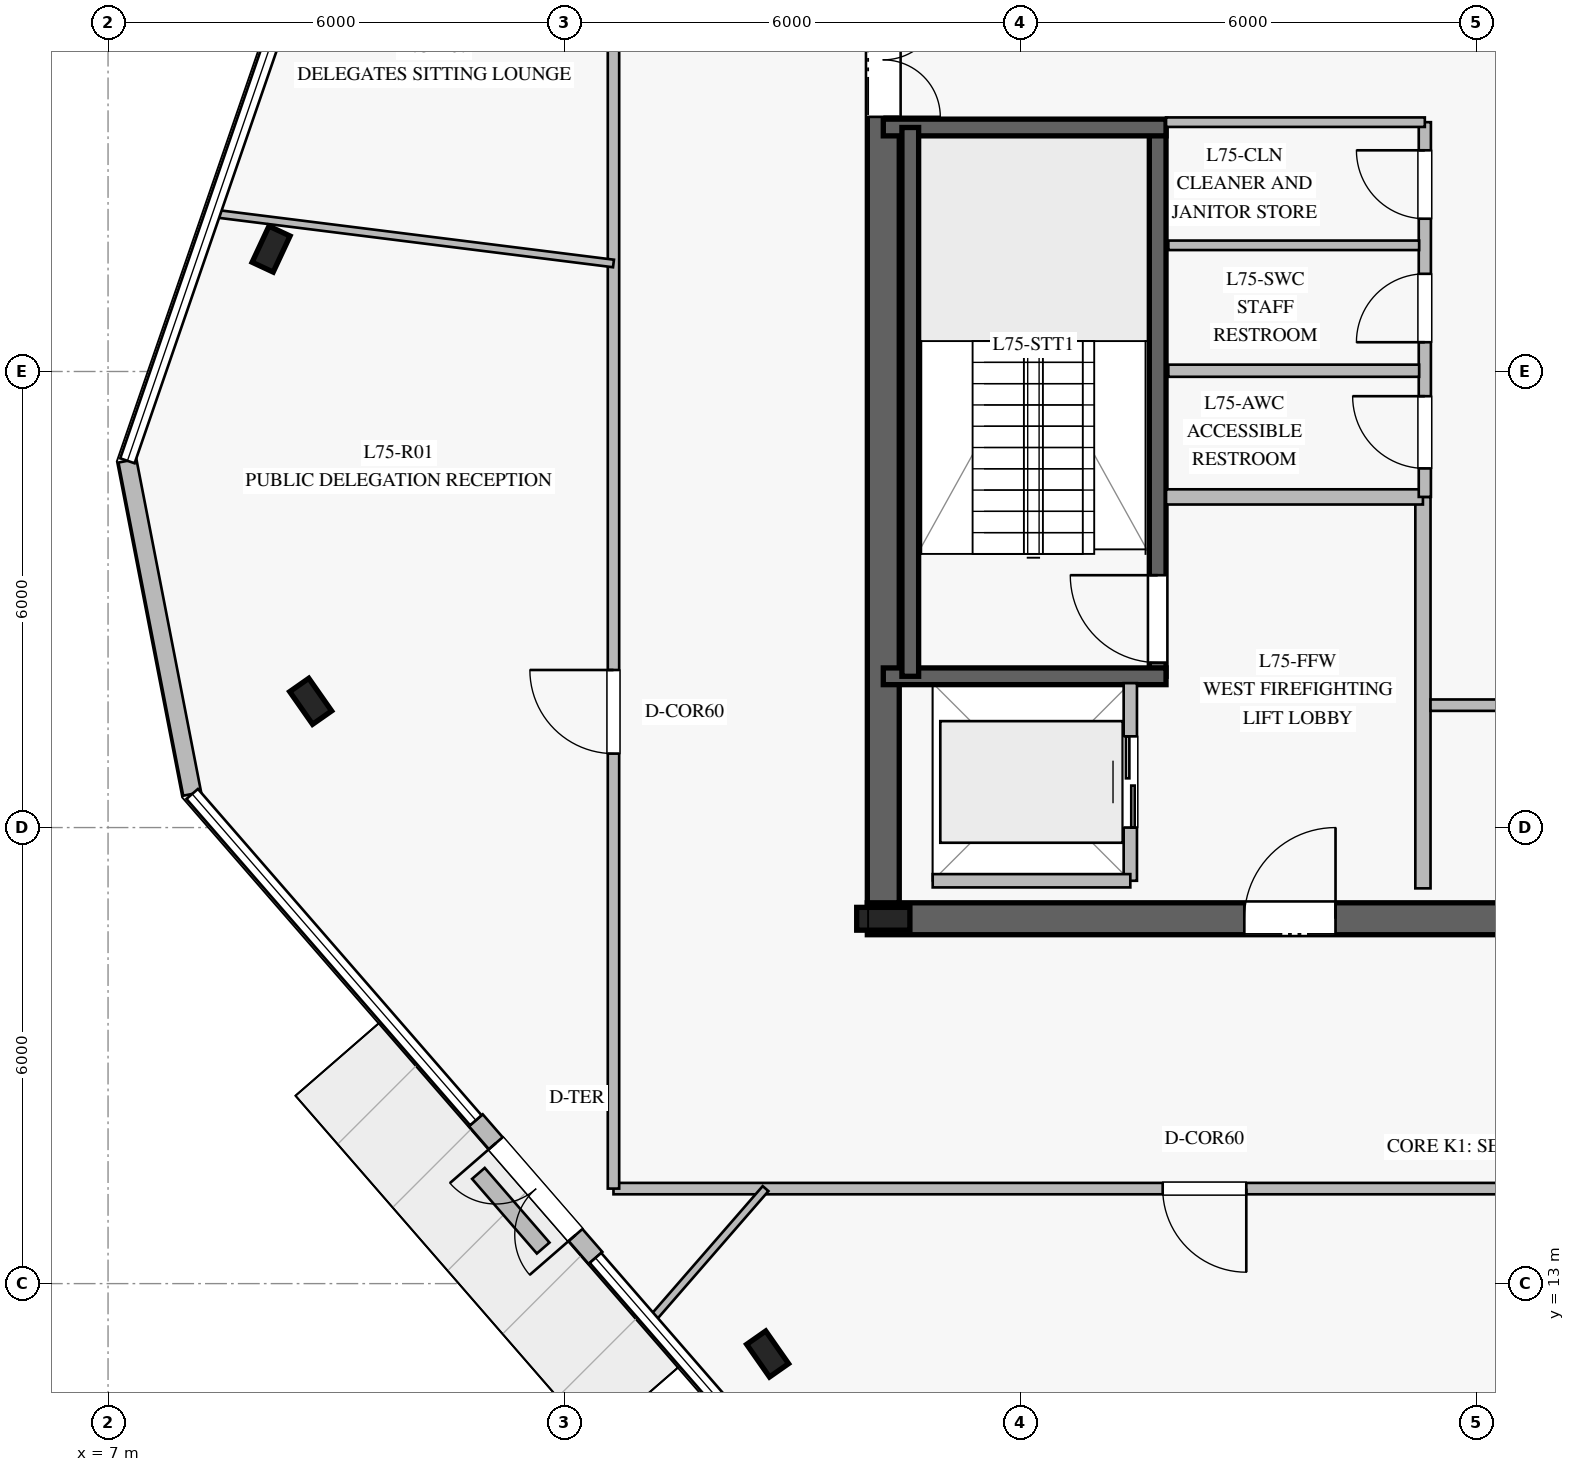
"""IFC4 building model, lengths in metres.
Left out: names, types, materials, properties, quantities, classifications, styles, units other than length and angle.
Written with IfcOpenShell. Run it as: python <this file> out.ifc"""

import sys

from ifc_helpers import new_model, si_unit, direction, frame, frame_2d, origin, origin_2d, place, context, subcontext, project, spatial, rectangle, i_section, extrude, element, fill, save


model = new_model("IFC4")
c1 = context("Model", 3, precision=1e-05, world=origin(), true_north=direction((0.0, 1.0)))
c2 = subcontext(c1, "Body", "Model", "MODEL_VIEW")
j1 = project(units=[si_unit("LENGTHUNIT", "METRE"), si_unit("PLANEANGLEUNIT", "RADIAN")], contexts=[c1])
p1 = place(None, origin())
s1 = spatial("IfcSite", under=j1, at=p1, CompositionType="ELEMENT")
p2 = place(p1, origin())
s2 = spatial("IfcBuilding", under=s1, at=p2, CompositionType="ELEMENT")
p3 = place(p2, frame((0.0, 0.0, 310.2)))
s3 = spatial("IfcBuildingStorey", under=s2, at=p3, CompositionType="ELEMENT", Elevation=310.2)
p4 = place(p3, frame((16.99, 17.8, 0.0), z_axis=(0.0, 0.0, 1.0), x_axis=(1.0, 0.0, 0.0)))
e1 = element("IfcWall", 1, at=p4, inside=s3, PredefinedType="SHEAR", context=c2, shape_type="SweptSolid", body=[
    extrude(rectangle(XDim=16.02, YDim=0.42, at=frame_2d((8.01, 0.0))), origin(), (0.0, 0.0, 1.0), 3.78),
])
p5 = place(p4, frame((4.96, 0.0, 0.0)))
e2 = element("IfcOpeningElement", 2, at=p5, cuts=e1, PredefinedType="OPENING", context=c2, shape_type="SweptSolid", body=[
    extrude(rectangle(XDim=1.2, YDim=2.25, at=frame_2d((0.6, 1.125))), frame((0.0, 0.22, 0.0), z_axis=(0.0, -1.0, 0.0), x_axis=(1.0, 0.0, 0.0)), (0.0, 0.0, 1.0), 0.44),
])
p6 = place(p4, frame((13.91, 0.0, 0.0)))
e3 = element("IfcOpeningElement", 3, at=p6, cuts=e1, PredefinedType="OPENING", context=c2, shape_type="SweptSolid", body=[
    extrude(rectangle(XDim=0.9, YDim=2.1, at=frame_2d((0.45, 1.05))), frame((0.0, 0.22, 0.0), z_axis=(0.0, -1.0, 0.0), x_axis=(1.0, 0.0, 0.0)), (0.0, 0.0, 1.0), 0.44),
])
p7 = place(p4, frame((9.16, 0.0, 0.0)))
e4 = element("IfcOpeningElement", 4, at=p7, cuts=e1, PredefinedType="OPENING", context=c2, shape_type="SweptSolid", body=[
    extrude(rectangle(XDim=1.1, YDim=2.2, at=frame_2d((0.55, 1.1))), frame((0.0, 0.22, 0.0), z_axis=(0.0, -1.0, 0.0), x_axis=(1.0, 0.0, 0.0)), (0.0, 0.0, 1.0), 0.44),
])
p8 = place(p3, frame((17.2, 31.99, 0.0), z_axis=(0.0, 0.0, 1.0), x_axis=(0.0, -1.0, 0.0)))
e5 = element("IfcWall", 5, at=p8, inside=s3, PredefinedType="SHEAR", context=c2, shape_type="SweptSolid", body=[
    extrude(rectangle(XDim=13.98, YDim=0.42, at=frame_2d((6.99, 0.0))), origin(), (0.0, 0.0, 1.0), 3.78),
])
p9 = place(p8, frame((2.14, 0.0, 0.0)))
e6 = element("IfcOpeningElement", 6, at=p9, cuts=e5, PredefinedType="OPENING", context=c2, shape_type="SweptSolid", body=[
    extrude(rectangle(XDim=1.5, YDim=2.2, at=frame_2d((0.75, 1.1))), frame((0.0, 0.22, 0.0), z_axis=(0.0, -1.0, 0.0), x_axis=(1.0, 0.0, 0.0)), (0.0, 0.0, 1.0), 0.44),
])
p10 = place(p3, frame((17.2, 17.8, 0.0), z_axis=(0.0, 0.0, 1.0), x_axis=(1.0, 0.0, 0.0)))
e7 = element("IfcColumn", 7, at=p10, inside=s3, PredefinedType="COLUMN", context=c2, shape_type="SweptSolid", body=[
    extrude(i_section(OverallWidth=0.3, OverallDepth=0.7, WebThickness=0.017, FlangeThickness=0.032, at=origin_2d()), origin(), (0.0, 0.0, 1.0), 4.0),
])
p11 = place(p3, frame((20.81, 20.99, 0.0), z_axis=(0.0, 0.0, 1.0), x_axis=(0.0, 1.0, 0.0)))
e8 = element("IfcWall", 8, at=p11, inside=s3, PredefinedType="SOLIDWALL", context=c2, shape_type="SweptSolid", body=[
    extrude(rectangle(XDim=7.22, YDim=0.22, at=frame_2d((3.61, 0.0))), origin(), (0.0, 0.0, 1.0), 3.78),
])
p12 = place(p11, frame((0.18, 0.0, 0.0)))
e9 = element("IfcOpeningElement", 9, at=p12, cuts=e8, PredefinedType="OPENING", context=c2, shape_type="SweptSolid", body=[
    extrude(rectangle(XDim=1.15, YDim=2.2, at=frame_2d((0.575, 1.1))), frame((0.0, 0.12, 0.0), z_axis=(0.0, -1.0, 0.0), x_axis=(1.0, 0.0, 0.0)), (0.0, 0.0, 1.0), 0.24),
])
for number, where, z_axis, x_axis in (
    (10, (17.2, 20.99, 0.0), (0.0, 0.0, 1.0), (1.0, 0.0, 0.0)),
    (11, (17.2, 28.21, 0.0), (0.0, 0.0, 1.0), (1.0, 0.0, 0.0)),
):
    element("IfcWall", number, at=place(p3, frame(where, z_axis=z_axis, x_axis=x_axis)), inside=s3, PredefinedType="SOLIDWALL", context=c2, shape_type="SweptSolid", body=[
        extrude(rectangle(XDim=3.72, YDim=0.22, at=frame_2d((1.86, 0.0))), origin(), (0.0, 0.0, 1.0), 3.78),
    ])
p13 = place(p3, frame((17.555, 28.21, 0.0), z_axis=(0.0, 0.0, 1.0), x_axis=(0.0, -1.0, 0.0)))
e12 = element("IfcWall", 12, at=p13, inside=s3, PredefinedType="SOLIDWALL", context=c2, shape_type="SweptSolid", body=[
    extrude(rectangle(XDim=7.22, YDim=0.22, at=frame_2d((3.61, 0.0))), origin(), (0.0, 0.0, 1.0), 3.78),
])
for number, where, z_axis, x_axis in (
    (13, (9.145, 26.61, 0.0), (0.0, 0.0, 1.0), (0.423, 0.906, 0.0)),
    (14, (9.666, 20.661, 0.0), (0.0, 0.0, 1.0), (-0.574, 0.819, 0.0)),
    (15, (15.678, 12.074, 0.0), (0.0, 0.0, 1.0), (-0.574, 0.819, 0.0)),
):
    element("IfcColumn", number, at=place(p3, frame(where, z_axis=z_axis, x_axis=x_axis)), inside=s3, PredefinedType="COLUMN", context=c2, shape_type="SweptSolid", body=[
        extrude(i_section(OverallWidth=0.306, OverallDepth=0.524, WebThickness=0.021, FlangeThickness=0.04, at=origin_2d()), origin(), (0.0, 0.0, 1.0), 4.0),
    ])
p14 = place(p3, frame((7.255, 23.825, 0.0), z_axis=(0.0, 0.0, 1.0), x_axis=(0.190824290845, -0.981624210186, 0.0)))
e16 = element("IfcWall", 16, at=p14, inside=s3, PredefinedType="STANDARD", context=c2, shape_type="SweptSolid", body=[
    extrude(rectangle(XDim=4.465, YDim=0.24, at=frame_2d((2.232, 0.0))), origin(), (0.0, 0.0, 1.0), 3.78),
])
p15 = place(p3, frame((11.839, 15.149, 0.0), z_axis=(0.0, 0.0, 1.0), x_axis=(0.655979683466, -0.754778546913, 0.0)))
e17 = element("IfcWall", 17, at=p15, inside=s3, PredefinedType="STANDARD", context=c2, shape_type="SweptSolid", body=[
    extrude(rectangle(XDim=2.399, YDim=0.24, at=frame_2d((1.2, 0.0))), origin(), (0.0, 0.0, 1.0), 3.78),
])
p16 = place(p15, frame((0.4, 0.0, 0.0)))
e18 = element("IfcOpeningElement", 18, at=p16, cuts=e17, PredefinedType="OPENING", context=c2, shape_type="SweptSolid", body=[
    extrude(rectangle(XDim=1.6, YDim=2.25, at=frame_2d((0.8, 1.125))), frame((0.0, 0.13, 0.0), z_axis=(0.0, -1.0, 0.0), x_axis=(1.0, 0.0, 0.0)), (0.0, 0.0, 1.0), 0.26),
])
p17 = place(p3, frame((11.873, 14.45, 0.0), z_axis=(0.0, 0.0, 1.0), x_axis=(0.655387978368, -0.755292392263, 0.0)))
e19 = element("IfcWall", 19, at=p17, inside=s3, PredefinedType="USERDEFINED", context=c2, shape_type="SweptSolid", body=[
    extrude(rectangle(XDim=1.3, YDim=0.22, at=frame_2d((0.65, 0.0))), origin(), (0.0, 0.0, 1.0), 0.4),
])
p18 = place(p3, frame((24.3, 18.2, 0.0), z_axis=(0.0, 0.0, 1.0), x_axis=(0.0, 1.0, 0.0)))
e20 = element("IfcWall", 20, at=p18, inside=s3, PredefinedType="PARTITIONING", context=c2, shape_type="SweptSolid", body=[
    extrude(rectangle(XDim=5.15, YDim=0.2, at=frame_2d((2.575, 0.0))), origin(), (0.0, 0.0, 1.0), 3.78),
])
p19 = place(p3, frame((20.92, 23.35, 0.0), z_axis=(0.0, 0.0, 1.0), x_axis=(1.0, 0.0, 0.0)))
e21 = element("IfcWall", 21, at=p19, inside=s3, PredefinedType="PARTITIONING", context=c2, shape_type="SweptSolid", body=[
    extrude(rectangle(XDim=3.38, YDim=0.2, at=frame_2d((1.69, 0.0))), origin(), (0.0, 0.0, 1.0), 3.78),
])
p20 = place(p3, frame((24.325, 23.35, 0.0), z_axis=(0.0, 0.0, 1.0), x_axis=(0.0, 1.0, 0.0)))
e22 = element("IfcWall", 22, at=p20, inside=s3, PredefinedType="PLUMBINGWALL", context=c2, shape_type="SweptSolid", body=[
    extrude(rectangle(XDim=4.93, YDim=0.16, at=frame_2d((2.465, 0.0))), origin(), (0.0, 0.0, 1.0), 3.78),
])
p21 = place(p20, frame((0.375, 0.0, 0.0)))
e23 = element("IfcOpeningElement", 23, at=p21, cuts=e22, PredefinedType="OPENING", context=c2, shape_type="SweptSolid", body=[
    extrude(rectangle(XDim=0.95, YDim=2.1, at=frame_2d((0.475, 1.05))), frame((0.0, 0.09, 0.0), z_axis=(0.0, -1.0, 0.0), x_axis=(1.0, 0.0, 0.0)), (0.0, 0.0, 1.0), 0.18),
])
p22 = place(p20, frame((2.035, 0.0, 0.0)))
e24 = element("IfcOpeningElement", 24, at=p22, cuts=e22, PredefinedType="OPENING", context=c2, shape_type="SweptSolid", body=[
    extrude(rectangle(XDim=0.9, YDim=2.1, at=frame_2d((0.45, 1.05))), frame((0.0, 0.09, 0.0), z_axis=(0.0, -1.0, 0.0), x_axis=(1.0, 0.0, 0.0)), (0.0, 0.0, 1.0), 0.18),
])
p23 = place(p20, frame((3.66, 0.0, 0.0)))
e25 = element("IfcOpeningElement", 25, at=p23, cuts=e22, PredefinedType="OPENING", context=c2, shape_type="SweptSolid", body=[
    extrude(rectangle(XDim=0.9, YDim=2.1, at=frame_2d((0.45, 1.05))), frame((0.0, 0.09, 0.0), z_axis=(0.0, -1.0, 0.0), x_axis=(1.0, 0.0, 0.0)), (0.0, 0.0, 1.0), 0.18),
])
p24 = place(p3, frame((20.92, 28.28, 0.0), z_axis=(0.0, 0.0, 1.0), x_axis=(1.0, 0.0, 0.0)))
e26 = element("IfcWall", 26, at=p24, inside=s3, PredefinedType="PARTITIONING", context=c2, shape_type="SweptSolid", body=[
    extrude(rectangle(XDim=3.405, YDim=0.125, at=frame_2d((1.703, 0.0))), origin(), (0.0, 0.0, 1.0), 3.78),
])
p25 = place(p3, frame((20.95, 25.01, 0.0), z_axis=(0.0, 0.0, 1.0), x_axis=(1.0, 0.0, 0.0)))
e27 = element("IfcWall", 27, at=p25, inside=s3, PredefinedType="PLUMBINGWALL", context=c2, shape_type="SweptSolid", body=[
    extrude(rectangle(XDim=3.3, YDim=0.16, at=frame_2d((1.65, 0.0))), origin(), (0.0, 0.0, 1.0), 3.78),
])
p26 = place(p3, frame((20.95, 26.66, 0.0), z_axis=(0.0, 0.0, 1.0), x_axis=(1.0, 0.0, 0.0)))
e28 = element("IfcWall", 28, at=p26, inside=s3, PredefinedType="PARTITIONING", context=c2, shape_type="SweptSolid", body=[
    extrude(rectangle(XDim=3.3, YDim=0.125, at=frame_2d((1.65, 0.0))), origin(), (0.0, 0.0, 1.0), 3.78),
])
p27 = place(p3, frame((24.4, 20.61, 0.0), z_axis=(0.0, 0.0, 1.0), x_axis=(1.0, 0.0, 0.0)))
e29 = element("IfcWall", 29, at=p27, inside=s3, PredefinedType="PARTITIONING", context=c2, shape_type="SweptSolid", body=[
    extrude(rectangle(XDim=5.9, YDim=0.15, at=frame_2d((2.95, 0.0))), origin(), (0.0, 0.0, 1.0), 3.78),
])
p28 = place(p3, frame((20.45, 18.3, 0.0), z_axis=(0.0, 0.0, 1.0), x_axis=(0.0, 1.0, 0.0)))
e30 = element("IfcWall", 30, at=p28, inside=s3, PredefinedType="PARTITIONING", context=c2, shape_type="SweptSolid", body=[
    extrude(rectangle(XDim=2.6, YDim=0.175, at=frame_2d((1.3, 0.0))), origin(), (0.0, 0.0, 1.0), 3.78),
])
p29 = place(p28, frame((0.7, 0.0, 0.0)))
e31 = element("IfcOpeningElement", 31, at=p29, cuts=e30, PredefinedType="OPENING", context=c2, shape_type="SweptSolid", body=[
    extrude(rectangle(XDim=1.2, YDim=2.2, at=frame_2d((0.6, 1.1))), frame((0.0, 0.098, 0.0), z_axis=(0.0, -1.0, 0.0), x_axis=(1.0, 0.0, 0.0)), (0.0, 0.0, 1.0), 0.195),
])
p30 = place(p3, frame((17.85, 18.3, 0.0), z_axis=(0.0, 0.0, 1.0), x_axis=(1.0, 0.0, 0.0)))
e32 = element("IfcWall", 32, at=p30, inside=s3, PredefinedType="PARTITIONING", context=c2, shape_type="SweptSolid", body=[
    extrude(rectangle(XDim=2.6, YDim=0.175, at=frame_2d((1.3, 0.0))), origin(), (0.0, 0.0, 1.0), 3.78),
])
p31 = place(p3, frame((36.35, 14.25, 0.0), z_axis=(0.0, 0.0, 1.0), x_axis=(-1.0, 0.0, 0.0)))
e33 = element("IfcWall", 33, at=p31, inside=s3, PredefinedType="PARTITIONING", context=c2, shape_type="SweptSolid", body=[
    extrude(rectangle(XDim=22.7, YDim=0.15, at=frame_2d((11.35, 0.0))), origin(), (0.0, 0.0, 1.0), 3.28),
])
p32 = place(p31, frame((14.374, 0.0, 0.0)))
e34 = element("IfcOpeningElement", 34, at=p32, cuts=e33, PredefinedType="OPENING", context=c2, shape_type="SweptSolid", body=[
    extrude(rectangle(XDim=1.1, YDim=2.2, at=frame_2d((0.55, 1.1))), frame((0.0, 0.085, 0.0), z_axis=(0.0, -1.0, 0.0), x_axis=(1.0, 0.0, 0.0)), (0.0, 0.0, 1.0), 0.17),
])
p33 = place(p3, frame((13.65, 14.25, 0.0), z_axis=(0.0, 0.0, 1.0), x_axis=(0.0, 1.0, 0.0)))
e35 = element("IfcWall", 35, at=p33, inside=s3, PredefinedType="PARTITIONING", context=c2, shape_type="SweptSolid", body=[
    extrude(rectangle(XDim=21.5, YDim=0.15, at=frame_2d((10.75, 0.0))), origin(), (0.0, 0.0, 1.0), 3.28),
])
p34 = place(p33, frame((5.723, 0.0, 0.0)))
e36 = element("IfcOpeningElement", 36, at=p34, cuts=e35, PredefinedType="OPENING", context=c2, shape_type="SweptSolid", body=[
    extrude(rectangle(XDim=1.1, YDim=2.2, at=frame_2d((0.55, 1.1))), frame((0.0, 0.085, 0.0), z_axis=(0.0, -1.0, 0.0), x_axis=(1.0, 0.0, 0.0)), (0.0, 0.0, 1.0), 0.17),
])
p35 = place(p3, frame((13.65, 26.421, 0.0), z_axis=(0.0, 0.0, 1.0), x_axis=(-0.992232445965, 0.12439764135, 0.0)))
e37 = element("IfcWall", 37, at=p35, inside=s3, PredefinedType="MOVABLE", context=c2, shape_type="SweptSolid", body=[
    extrude(rectangle(XDim=5.299, YDim=0.1, at=frame_2d((2.649, 0.0))), origin(), (0.0, 0.0, 1.0), 3.28),
])
p36 = place(p3, frame((15.651, 14.25, 0.0), z_axis=(0.0, 0.0, 1.0), x_axis=(-0.656104924623, -0.754669681308, 0.0)))
e38 = element("IfcWall", 38, at=p36, inside=s3, PredefinedType="MOVABLE", context=c2, shape_type="SweptSolid", body=[
    extrude(rectangle(XDim=2.294, YDim=0.1, at=frame_2d((1.147, 0.0))), origin(), (0.0, 0.0, 1.0), 3.28),
])
p37 = place(p16, frame((1.6, 0.0, 0.0), z_axis=(0.0, 0.0, 1.0), x_axis=(-1.0, 0.0, 0.0)))
e39 = element("IfcDoor", 39, at=p37, inside=s3, OperationType="DOUBLE_DOOR_SINGLE_SWING", PredefinedType="DOOR", context=c2, shape_type="SweptSolid", body=[
    extrude(rectangle(XDim=1.6, YDim=2.25, at=frame_2d((0.8, 1.125))), frame((0.0, 0.025, 0.0), z_axis=(0.0, -1.0, 0.0), x_axis=(1.0, 0.0, 0.0)), (0.0, 0.0, 1.0), 0.05),
])
fill(e18, e39)
p38 = place(p12, origin())
e40 = element("IfcDoor", 40, at=p38, inside=s3, OperationType="SINGLE_SWING_RIGHT", PredefinedType="DOOR", context=c2, shape_type="SweptSolid", body=[
    extrude(rectangle(XDim=1.15, YDim=2.2, at=frame_2d((0.575, 1.1))), frame((0.0, 0.025, 0.0), z_axis=(0.0, -1.0, 0.0), x_axis=(1.0, 0.0, 0.0)), (0.0, 0.0, 1.0), 0.05),
])
fill(e9, e40)
p39 = place(p5, origin())
e41 = element("IfcDoor", 41, at=p39, inside=s3, OperationType="SINGLE_SWING_RIGHT", PredefinedType="DOOR", context=c2, shape_type="SweptSolid", body=[
    extrude(rectangle(XDim=1.2, YDim=2.25, at=frame_2d((0.6, 1.125))), frame((0.0, 0.025, 0.0), z_axis=(0.0, -1.0, 0.0), x_axis=(1.0, 0.0, 0.0)), (0.0, 0.0, 1.0), 0.05),
])
fill(e2, e41)
p40 = place(p9, origin())
e42 = element("IfcDoor", 42, at=p40, inside=s3, OperationType="DOUBLE_DOOR_SINGLE_SWING", PredefinedType="DOOR", context=c2, shape_type="SweptSolid", body=[
    extrude(rectangle(XDim=1.5, YDim=2.2, at=frame_2d((0.75, 1.1))), frame((0.0, 0.025, 0.0), z_axis=(0.0, -1.0, 0.0), x_axis=(1.0, 0.0, 0.0)), (0.0, 0.0, 1.0), 0.05),
])
fill(e6, e42)
p41 = place(p21, origin())
e43 = element("IfcDoor", 43, at=p41, inside=s3, OperationType="SINGLE_SWING_RIGHT", PredefinedType="DOOR", context=c2, shape_type="SweptSolid", body=[
    extrude(rectangle(XDim=0.95, YDim=2.1, at=frame_2d((0.475, 1.05))), frame((0.0, 0.025, 0.0), z_axis=(0.0, -1.0, 0.0), x_axis=(1.0, 0.0, 0.0)), (0.0, 0.0, 1.0), 0.05),
])
fill(e23, e43)
p42 = place(p22, origin())
e44 = element("IfcDoor", 44, at=p42, inside=s3, OperationType="SINGLE_SWING_LEFT", PredefinedType="DOOR", context=c2, shape_type="SweptSolid", body=[
    extrude(rectangle(XDim=0.9, YDim=2.1, at=frame_2d((0.45, 1.05))), frame((0.0, 0.025, 0.0), z_axis=(0.0, -1.0, 0.0), x_axis=(1.0, 0.0, 0.0)), (0.0, 0.0, 1.0), 0.05),
])
fill(e24, e44)
p43 = place(p23, origin())
e45 = element("IfcDoor", 45, at=p43, inside=s3, OperationType="SINGLE_SWING_RIGHT", PredefinedType="DOOR", context=c2, shape_type="SweptSolid", body=[
    extrude(rectangle(XDim=0.9, YDim=2.1, at=frame_2d((0.45, 1.05))), frame((0.0, 0.025, 0.0), z_axis=(0.0, -1.0, 0.0), x_axis=(1.0, 0.0, 0.0)), (0.0, 0.0, 1.0), 0.05),
])
fill(e25, e45)
p44 = place(p29, origin())
e46 = element("IfcDoor", 46, at=p44, inside=s3, OperationType="DOUBLE_DOOR_SLIDING", PredefinedType="DOOR", context=c2, shape_type="SweptSolid", body=[
    extrude(rectangle(XDim=1.2, YDim=2.2, at=frame_2d((0.6, 1.1))), frame((0.0, 0.025, 0.0), z_axis=(0.0, -1.0, 0.0), x_axis=(1.0, 0.0, 0.0)), (0.0, 0.0, 1.0), 0.05),
])
fill(e31, e46)
p45 = place(p34, origin())
e47 = element("IfcDoor", 47, at=p45, inside=s3, OperationType="SINGLE_SWING_RIGHT", PredefinedType="DOOR", context=c2, shape_type="SweptSolid", body=[
    extrude(rectangle(XDim=1.1, YDim=2.2, at=frame_2d((0.55, 1.1))), frame((0.0, 0.025, 0.0), z_axis=(0.0, -1.0, 0.0), x_axis=(1.0, 0.0, 0.0)), (0.0, 0.0, 1.0), 0.05),
])
fill(e36, e47)
p46 = place(p32, origin())
e48 = element("IfcDoor", 48, at=p46, inside=s3, OperationType="SINGLE_SWING_LEFT", PredefinedType="DOOR", context=c2, shape_type="SweptSolid", body=[
    extrude(rectangle(XDim=1.1, YDim=2.2, at=frame_2d((0.55, 1.1))), frame((0.0, 0.025, 0.0), z_axis=(0.0, -1.0, 0.0), x_axis=(1.0, 0.0, 0.0)), (0.0, 0.0, 1.0), 0.05),
])
fill(e34, e48)
save(model, sys.argv[1])
